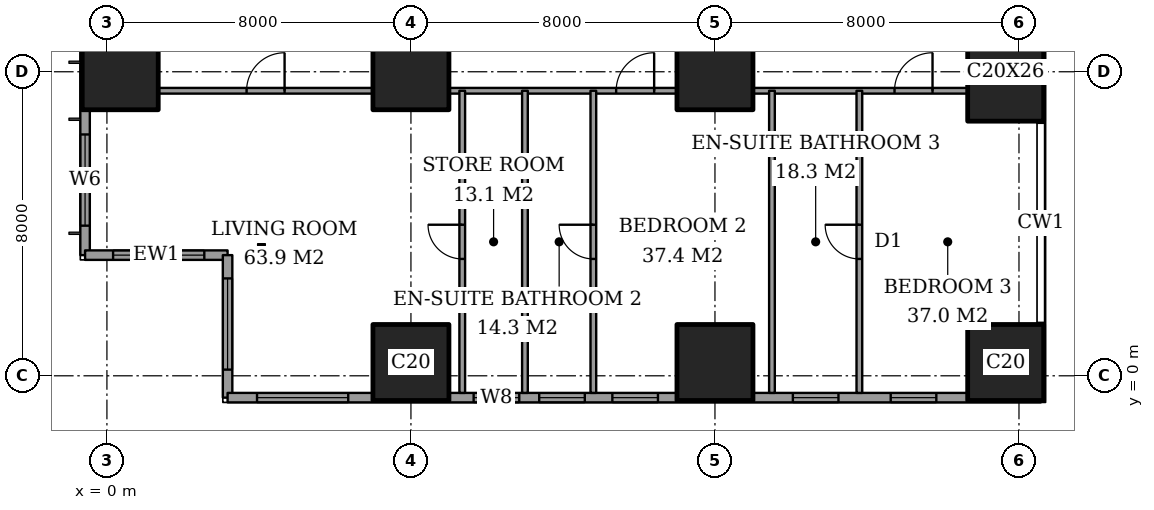
"""IFC4 building model, lengths in metres.
Left out: names, types, materials, properties, quantities, classifications, styles, units other than length and angle.
Written with IfcOpenShell. Run it as: python <this file> out.ifc"""

import sys

from ifc_helpers import new_model, si_unit, direction, frame, frame_2d, origin, origin_2d, place, context, subcontext, project, spatial, rectangle, extrude, element, fill, save


model = new_model("IFC4")
c1 = context("Model", 3, precision=1e-05, world=origin(), true_north=direction((0.0, 1.0)))
c2 = subcontext(c1, "Body", "Model", "MODEL_VIEW")
j1 = project(units=[si_unit("LENGTHUNIT", "METRE"), si_unit("PLANEANGLEUNIT", "RADIAN")], contexts=[c1])
p1 = place(None, origin())
s1 = spatial("IfcSite", under=j1, at=p1, CompositionType="ELEMENT")
p2 = place(p1, origin())
s2 = spatial("IfcBuilding", under=s1, at=p2, CompositionType="ELEMENT")
p3 = place(p2, frame((0.0, 0.0, 29.6)))
s3 = spatial("IfcBuildingStorey", under=s2, at=p3, CompositionType="ELEMENT", Elevation=29.6)
for number, where, z_axis, x_axis in (
    (1, (0.35, 8.0, 0.0), (0.0, 0.0, 1.0), (1.0, 0.0, 0.0)),
    (2, (8.0, 0.35, 0.0), (0.0, 0.0, 1.0), (1.0, 0.0, 0.0)),
    (3, (8.0, 8.0, 0.0), (0.0, 0.0, 1.0), (1.0, 0.0, 0.0)),
    (4, (16.0, 0.35, 0.0), (0.0, 0.0, 1.0), (1.0, 0.0, 0.0)),
    (5, (16.0, 8.0, 0.0), (0.0, 0.0, 1.0), (1.0, 0.0, 0.0)),
    (6, (23.65, 0.35, 0.0), (0.0, 0.0, 1.0), (1.0, 0.0, 0.0)),
):
    element("IfcColumn", number, at=place(p3, frame(where, z_axis=z_axis, x_axis=x_axis)), inside=s3, PredefinedType="COLUMN", context=c2, shape_type="SweptSolid", body=[
        extrude(rectangle(XDim=2.0, YDim=2.0, at=origin_2d()), origin(), (0.0, 0.0, 1.0), 3.6),
    ])
p4 = place(p3, frame((23.65, 8.0, 0.0), z_axis=(0.0, 0.0, 1.0), x_axis=(1.0, 0.0, 0.0)))
e7 = element("IfcColumn", 7, at=p4, inside=s3, PredefinedType="COLUMN", context=c2, shape_type="SweptSolid", body=[
    extrude(rectangle(XDim=2.0, YDim=2.6, at=origin_2d()), origin(), (0.0, 0.0, 1.0), 3.6),
])
p5 = place(p3, frame((-0.575, 44.825, 0.0), z_axis=(0.0, 0.0, 1.0), x_axis=(0.0, -1.0, 0.0)))
e8 = element("IfcWall", 8, at=p5, inside=s3, PredefinedType="SOLIDWALL", context=c2, shape_type="SweptSolid", body=[
    extrude(rectangle(XDim=41.65, YDim=0.25, at=frame_2d((20.825, 0.0))), origin(), (0.0, 0.0, 1.0), 3.6),
])
p6 = place(p5, frame((0.775, 0.0, 0.6)))
e9 = element("IfcOpeningElement", 9, at=p6, cuts=e8, PredefinedType="OPENING", context=c2, shape_type="SweptSolid", body=[
    extrude(rectangle(XDim=2.4, YDim=2.0, at=frame_2d((1.2, 1.0))), frame((0.0, 0.135, 0.0), z_axis=(0.0, -1.0, 0.0), x_axis=(1.0, 0.0, 0.0)), (0.0, 0.0, 1.0), 0.27),
])
p7 = place(p5, frame((6.225, 0.0, 0.6)))
e10 = element("IfcOpeningElement", 10, at=p7, cuts=e8, PredefinedType="OPENING", context=c2, shape_type="SweptSolid", body=[
    extrude(rectangle(XDim=1.2, YDim=2.0, at=frame_2d((0.6, 1.0))), frame((0.0, 0.135, 0.0), z_axis=(0.0, -1.0, 0.0), x_axis=(1.0, 0.0, 0.0)), (0.0, 0.0, 1.0), 0.27),
])
p8 = place(p5, frame((8.625, 0.0, 0.6)))
e11 = element("IfcOpeningElement", 11, at=p8, cuts=e8, PredefinedType="OPENING", context=c2, shape_type="SweptSolid", body=[
    extrude(rectangle(XDim=2.4, YDim=2.0, at=frame_2d((1.2, 1.0))), frame((0.0, 0.135, 0.0), z_axis=(0.0, -1.0, 0.0), x_axis=(1.0, 0.0, 0.0)), (0.0, 0.0, 1.0), 0.27),
])
p9 = place(p5, frame((15.625, 0.0, 0.6)))
e12 = element("IfcOpeningElement", 12, at=p9, cuts=e8, PredefinedType="OPENING", context=c2, shape_type="SweptSolid", body=[
    extrude(rectangle(XDim=2.4, YDim=2.0, at=frame_2d((1.2, 1.0))), frame((0.0, 0.135, 0.0), z_axis=(0.0, -1.0, 0.0), x_axis=(1.0, 0.0, 0.0)), (0.0, 0.0, 1.0), 0.27),
])
p10 = place(p5, frame((23.625, 0.0, 0.6)))
e13 = element("IfcOpeningElement", 13, at=p10, cuts=e8, PredefinedType="OPENING", context=c2, shape_type="SweptSolid", body=[
    extrude(rectangle(XDim=2.4, YDim=2.0, at=frame_2d((1.2, 1.0))), frame((0.0, 0.135, 0.0), z_axis=(0.0, -1.0, 0.0), x_axis=(1.0, 0.0, 0.0)), (0.0, 0.0, 1.0), 0.27),
])
p11 = place(p5, frame((30.825, 0.0, 0.6)))
e14 = element("IfcOpeningElement", 14, at=p11, cuts=e8, PredefinedType="OPENING", context=c2, shape_type="SweptSolid", body=[
    extrude(rectangle(XDim=2.4, YDim=2.0, at=frame_2d((1.2, 1.0))), frame((0.0, 0.135, 0.0), z_axis=(0.0, -1.0, 0.0), x_axis=(1.0, 0.0, 0.0)), (0.0, 0.0, 1.0), 0.27),
])
p12 = place(p5, frame((34.5, 0.0, 0.6)))
e15 = element("IfcOpeningElement", 15, at=p12, cuts=e8, PredefinedType="OPENING", context=c2, shape_type="SweptSolid", body=[
    extrude(rectangle(XDim=1.2, YDim=2.0, at=frame_2d((0.6, 1.0))), frame((0.0, 0.135, 0.0), z_axis=(0.0, -1.0, 0.0), x_axis=(1.0, 0.0, 0.0)), (0.0, 0.0, 1.0), 0.27),
])
p13 = place(p5, frame((38.475, 0.0, 0.6)))
e16 = element("IfcOpeningElement", 16, at=p13, cuts=e8, PredefinedType="OPENING", context=c2, shape_type="SweptSolid", body=[
    extrude(rectangle(XDim=2.4, YDim=2.0, at=frame_2d((1.2, 1.0))), frame((0.0, 0.135, 0.0), z_axis=(0.0, -1.0, 0.0), x_axis=(1.0, 0.0, 0.0)), (0.0, 0.0, 1.0), 0.27),
])
p14 = place(p3, frame((-0.575, 3.175, 0.0), z_axis=(0.0, 0.0, 1.0), x_axis=(1.0, 0.0, 0.0)))
e17 = element("IfcWall", 17, at=p14, inside=s3, PredefinedType="SOLIDWALL", context=c2, shape_type="SweptSolid", body=[
    extrude(rectangle(XDim=3.75, YDim=0.25, at=frame_2d((1.875, 0.0))), origin(), (0.0, 0.0, 1.0), 3.6),
])
p15 = place(p14, frame((0.738, 0.0, 0.6)))
e18 = element("IfcOpeningElement", 18, at=p15, cuts=e17, PredefinedType="OPENING", context=c2, shape_type="SweptSolid", body=[
    extrude(rectangle(XDim=2.4, YDim=2.0, at=frame_2d((1.2, 1.0))), frame((0.0, 0.135, 0.0), z_axis=(0.0, -1.0, 0.0), x_axis=(1.0, 0.0, 0.0)), (0.0, 0.0, 1.0), 0.27),
])
p16 = place(p3, frame((3.175, 3.175, 0.0), z_axis=(0.0, 0.0, 1.0), x_axis=(0.0, -1.0, 0.0)))
e19 = element("IfcWall", 19, at=p16, inside=s3, PredefinedType="SOLIDWALL", context=c2, shape_type="SweptSolid", body=[
    extrude(rectangle(XDim=3.75, YDim=0.25, at=frame_2d((1.875, 0.0))), origin(), (0.0, 0.0, 1.0), 3.6),
])
p17 = place(p16, frame((0.613, 0.0, 0.6)))
e20 = element("IfcOpeningElement", 20, at=p17, cuts=e19, PredefinedType="OPENING", context=c2, shape_type="SweptSolid", body=[
    extrude(rectangle(XDim=2.4, YDim=2.0, at=frame_2d((1.2, 1.0))), frame((0.0, 0.135, 0.0), z_axis=(0.0, -1.0, 0.0), x_axis=(1.0, 0.0, 0.0)), (0.0, 0.0, 1.0), 0.27),
])
p18 = place(p3, frame((3.175, -0.575, 0.0), z_axis=(0.0, 0.0, 1.0), x_axis=(1.0, 0.0, 0.0)))
e21 = element("IfcWall", 21, at=p18, inside=s3, PredefinedType="SOLIDWALL", context=c2, shape_type="SweptSolid", body=[
    extrude(rectangle(XDim=21.4, YDim=0.25, at=frame_2d((10.7, 0.0))), origin(), (0.0, 0.0, 1.0), 3.6),
])
p19 = place(p18, frame((0.775, 0.0, 0.6)))
e22 = element("IfcOpeningElement", 22, at=p19, cuts=e21, PredefinedType="OPENING", context=c2, shape_type="SweptSolid", body=[
    extrude(rectangle(XDim=2.4, YDim=2.0, at=frame_2d((1.2, 1.0))), frame((0.0, 0.135, 0.0), z_axis=(0.0, -1.0, 0.0), x_axis=(1.0, 0.0, 0.0)), (0.0, 0.0, 1.0), 0.27),
])
p20 = place(p18, frame((6.475, 0.0, 0.6)))
e23 = element("IfcOpeningElement", 23, at=p20, cuts=e21, PredefinedType="OPENING", context=c2, shape_type="SweptSolid", body=[
    extrude(rectangle(XDim=1.2, YDim=2.0, at=frame_2d((0.6, 1.0))), frame((0.0, 0.135, 0.0), z_axis=(0.0, -1.0, 0.0), x_axis=(1.0, 0.0, 0.0)), (0.0, 0.0, 1.0), 0.27),
])
p21 = place(p18, frame((8.2, 0.0, 0.6)))
e24 = element("IfcOpeningElement", 24, at=p21, cuts=e21, PredefinedType="OPENING", context=c2, shape_type="SweptSolid", body=[
    extrude(rectangle(XDim=1.2, YDim=2.0, at=frame_2d((0.6, 1.0))), frame((0.0, 0.135, 0.0), z_axis=(0.0, -1.0, 0.0), x_axis=(1.0, 0.0, 0.0)), (0.0, 0.0, 1.0), 0.27),
])
p22 = place(p18, frame((10.125, 0.0, 0.6)))
e25 = element("IfcOpeningElement", 25, at=p22, cuts=e21, PredefinedType="OPENING", context=c2, shape_type="SweptSolid", body=[
    extrude(rectangle(XDim=1.2, YDim=2.0, at=frame_2d((0.6, 1.0))), frame((0.0, 0.135, 0.0), z_axis=(0.0, -1.0, 0.0), x_axis=(1.0, 0.0, 0.0)), (0.0, 0.0, 1.0), 0.27),
])
p23 = place(p18, frame((14.875, 0.0, 0.6)))
e26 = element("IfcOpeningElement", 26, at=p23, cuts=e21, PredefinedType="OPENING", context=c2, shape_type="SweptSolid", body=[
    extrude(rectangle(XDim=1.2, YDim=2.0, at=frame_2d((0.6, 1.0))), frame((0.0, 0.135, 0.0), z_axis=(0.0, -1.0, 0.0), x_axis=(1.0, 0.0, 0.0)), (0.0, 0.0, 1.0), 0.27),
])
p24 = place(p18, frame((17.45, 0.0, 0.6)))
e27 = element("IfcOpeningElement", 27, at=p24, cuts=e21, PredefinedType="OPENING", context=c2, shape_type="SweptSolid", body=[
    extrude(rectangle(XDim=1.2, YDim=2.0, at=frame_2d((0.6, 1.0))), frame((0.0, 0.135, 0.0), z_axis=(0.0, -1.0, 0.0), x_axis=(1.0, 0.0, 0.0)), (0.0, 0.0, 1.0), 0.27),
])
p25 = place(p3, frame((1.35, 7.5, 0.0), z_axis=(0.0, 0.0, 1.0), x_axis=(1.0, 0.0, 0.0)))
e28 = element("IfcWall", 28, at=p25, inside=s3, PredefinedType="PARTITIONING", context=c2, shape_type="SweptSolid", body=[
    extrude(rectangle(XDim=5.65, YDim=0.15, at=frame_2d((2.825, 0.0))), origin(), (0.0, 0.0, 1.0), 3.35),
])
p26 = place(p25, frame((2.325, 0.0, 0.0)))
e29 = element("IfcOpeningElement", 29, at=p26, cuts=e28, PredefinedType="OPENING", context=c2, shape_type="SweptSolid", body=[
    extrude(rectangle(XDim=1.0, YDim=2.1, at=frame_2d((0.5, 1.05))), frame((0.0, 0.085, 0.0), z_axis=(0.0, -1.0, 0.0), x_axis=(1.0, 0.0, 0.0)), (0.0, 0.0, 1.0), 0.17),
])
p27 = place(p3, frame((9.0, 7.5, 0.0), z_axis=(0.0, 0.0, 1.0), x_axis=(1.0, 0.0, 0.0)))
e30 = element("IfcWall", 30, at=p27, inside=s3, PredefinedType="PARTITIONING", context=c2, shape_type="SweptSolid", body=[
    extrude(rectangle(XDim=6.0, YDim=0.15, at=frame_2d((3.0, 0.0))), origin(), (0.0, 0.0, 1.0), 3.35),
])
p28 = place(p27, frame((4.4, 0.0, 0.0)))
e31 = element("IfcOpeningElement", 31, at=p28, cuts=e30, PredefinedType="OPENING", context=c2, shape_type="SweptSolid", body=[
    extrude(rectangle(XDim=1.0, YDim=2.1, at=frame_2d((0.5, 1.05))), frame((0.0, 0.085, 0.0), z_axis=(0.0, -1.0, 0.0), x_axis=(1.0, 0.0, 0.0)), (0.0, 0.0, 1.0), 0.17),
])
p29 = place(p3, frame((17.0, 7.5, 0.0), z_axis=(0.0, 0.0, 1.0), x_axis=(1.0, 0.0, 0.0)))
e32 = element("IfcWall", 32, at=p29, inside=s3, PredefinedType="PARTITIONING", context=c2, shape_type="SweptSolid", body=[
    extrude(rectangle(XDim=5.65, YDim=0.15, at=frame_2d((2.825, 0.0))), origin(), (0.0, 0.0, 1.0), 3.35),
])
p30 = place(p29, frame((3.725, 0.0, 0.0)))
e33 = element("IfcOpeningElement", 33, at=p30, cuts=e32, PredefinedType="OPENING", context=c2, shape_type="SweptSolid", body=[
    extrude(rectangle(XDim=1.0, YDim=2.1, at=frame_2d((0.5, 1.05))), frame((0.0, 0.085, 0.0), z_axis=(0.0, -1.0, 0.0), x_axis=(1.0, 0.0, 0.0)), (0.0, 0.0, 1.0), 0.17),
])
p31 = place(p3, frame((9.35, -0.45, 0.0), z_axis=(0.0, 0.0, 1.0), x_axis=(0.0, 1.0, 0.0)))
e34 = element("IfcWall", 34, at=p31, inside=s3, PredefinedType="PARTITIONING", context=c2, shape_type="SweptSolid", body=[
    extrude(rectangle(XDim=7.95, YDim=0.15, at=frame_2d((3.975, 0.0))), origin(), (0.0, 0.0, 1.0), 3.35),
])
p32 = place(p31, frame((3.525, 0.0, 0.0)))
e35 = element("IfcOpeningElement", 35, at=p32, cuts=e34, PredefinedType="OPENING", context=c2, shape_type="SweptSolid", body=[
    extrude(rectangle(XDim=0.9, YDim=2.1, at=frame_2d((0.45, 1.05))), frame((0.0, 0.085, 0.0), z_axis=(0.0, -1.0, 0.0), x_axis=(1.0, 0.0, 0.0)), (0.0, 0.0, 1.0), 0.17),
])
p33 = place(p3, frame((11.0, -0.45, 0.0), z_axis=(0.0, 0.0, 1.0), x_axis=(0.0, 1.0, 0.0)))
e36 = element("IfcWall", 36, at=p33, inside=s3, PredefinedType="PARTITIONING", context=c2, shape_type="SweptSolid", body=[
    extrude(rectangle(XDim=7.95, YDim=0.15, at=frame_2d((3.975, 0.0))), origin(), (0.0, 0.0, 1.0), 3.35),
])
p34 = place(p3, frame((12.8, -0.45, 0.0), z_axis=(0.0, 0.0, 1.0), x_axis=(0.0, 1.0, 0.0)))
e37 = element("IfcWall", 37, at=p34, inside=s3, PredefinedType="PARTITIONING", context=c2, shape_type="SweptSolid", body=[
    extrude(rectangle(XDim=7.95, YDim=0.15, at=frame_2d((3.975, 0.0))), origin(), (0.0, 0.0, 1.0), 3.35),
])
p35 = place(p34, frame((3.525, 0.0, 0.0)))
e38 = element("IfcOpeningElement", 38, at=p35, cuts=e37, PredefinedType="OPENING", context=c2, shape_type="SweptSolid", body=[
    extrude(rectangle(XDim=0.9, YDim=2.1, at=frame_2d((0.45, 1.05))), frame((0.0, 0.085, 0.0), z_axis=(0.0, -1.0, 0.0), x_axis=(1.0, 0.0, 0.0)), (0.0, 0.0, 1.0), 0.17),
])
p36 = place(p3, frame((17.5, -0.45, 0.0), z_axis=(0.0, 0.0, 1.0), x_axis=(0.0, 1.0, 0.0)))
e39 = element("IfcWall", 39, at=p36, inside=s3, PredefinedType="PARTITIONING", context=c2, shape_type="SweptSolid", body=[
    extrude(rectangle(XDim=7.95, YDim=0.15, at=frame_2d((3.975, 0.0))), origin(), (0.0, 0.0, 1.0), 3.35),
])
p37 = place(p3, frame((19.8, -0.45, 0.0), z_axis=(0.0, 0.0, 1.0), x_axis=(0.0, 1.0, 0.0)))
e40 = element("IfcWall", 40, at=p37, inside=s3, PredefinedType="PARTITIONING", context=c2, shape_type="SweptSolid", body=[
    extrude(rectangle(XDim=7.95, YDim=0.15, at=frame_2d((3.975, 0.0))), origin(), (0.0, 0.0, 1.0), 3.35),
])
p38 = place(p37, frame((3.525, 0.0, 0.0)))
e41 = element("IfcOpeningElement", 41, at=p38, cuts=e40, PredefinedType="OPENING", context=c2, shape_type="SweptSolid", body=[
    extrude(rectangle(XDim=0.9, YDim=2.1, at=frame_2d((0.45, 1.05))), frame((0.0, 0.085, 0.0), z_axis=(0.0, -1.0, 0.0), x_axis=(1.0, 0.0, 0.0)), (0.0, 0.0, 1.0), 0.17),
])
p39 = place(p13, origin())
e42 = element("IfcWindow", 42, at=p39, inside=s3, PartitioningType="SINGLE_PANEL", PredefinedType="WINDOW", context=c2, shape_type="SweptSolid", body=[
    extrude(rectangle(XDim=2.4, YDim=2.0, at=frame_2d((1.2, 1.0))), frame((0.0, 0.03, 0.0), z_axis=(0.0, -1.0, 0.0), x_axis=(1.0, 0.0, 0.0)), (0.0, 0.0, 1.0), 0.06),
])
fill(e16, e42)
p40 = place(p15, origin())
e43 = element("IfcWindow", 43, at=p40, inside=s3, PartitioningType="SINGLE_PANEL", PredefinedType="WINDOW", context=c2, shape_type="SweptSolid", body=[
    extrude(rectangle(XDim=2.4, YDim=2.0, at=frame_2d((1.2, 1.0))), frame((0.0, 0.03, 0.0), z_axis=(0.0, -1.0, 0.0), x_axis=(1.0, 0.0, 0.0)), (0.0, 0.0, 1.0), 0.06),
])
fill(e18, e43)
p41 = place(p17, origin())
e44 = element("IfcWindow", 44, at=p41, inside=s3, PartitioningType="SINGLE_PANEL", PredefinedType="WINDOW", context=c2, shape_type="SweptSolid", body=[
    extrude(rectangle(XDim=2.4, YDim=2.0, at=frame_2d((1.2, 1.0))), frame((0.0, 0.03, 0.0), z_axis=(0.0, -1.0, 0.0), x_axis=(1.0, 0.0, 0.0)), (0.0, 0.0, 1.0), 0.06),
])
fill(e20, e44)
p42 = place(p19, origin())
e45 = element("IfcWindow", 45, at=p42, inside=s3, PartitioningType="SINGLE_PANEL", PredefinedType="WINDOW", context=c2, shape_type="SweptSolid", body=[
    extrude(rectangle(XDim=2.4, YDim=2.0, at=frame_2d((1.2, 1.0))), frame((0.0, 0.03, 0.0), z_axis=(0.0, -1.0, 0.0), x_axis=(1.0, 0.0, 0.0)), (0.0, 0.0, 1.0), 0.06),
])
fill(e22, e45)
p43 = place(p20, origin())
e46 = element("IfcWindow", 46, at=p43, inside=s3, PartitioningType="SINGLE_PANEL", PredefinedType="WINDOW", context=c2, shape_type="SweptSolid", body=[
    extrude(rectangle(XDim=1.2, YDim=2.0, at=frame_2d((0.6, 1.0))), frame((0.0, 0.03, 0.0), z_axis=(0.0, -1.0, 0.0), x_axis=(1.0, 0.0, 0.0)), (0.0, 0.0, 1.0), 0.06),
])
fill(e23, e46)
p44 = place(p21, origin())
e47 = element("IfcWindow", 47, at=p44, inside=s3, PartitioningType="SINGLE_PANEL", PredefinedType="WINDOW", context=c2, shape_type="SweptSolid", body=[
    extrude(rectangle(XDim=1.2, YDim=2.0, at=frame_2d((0.6, 1.0))), frame((0.0, 0.03, 0.0), z_axis=(0.0, -1.0, 0.0), x_axis=(1.0, 0.0, 0.0)), (0.0, 0.0, 1.0), 0.06),
])
fill(e24, e47)
p45 = place(p22, origin())
e48 = element("IfcWindow", 48, at=p45, inside=s3, PartitioningType="SINGLE_PANEL", PredefinedType="WINDOW", context=c2, shape_type="SweptSolid", body=[
    extrude(rectangle(XDim=1.2, YDim=2.0, at=frame_2d((0.6, 1.0))), frame((0.0, 0.03, 0.0), z_axis=(0.0, -1.0, 0.0), x_axis=(1.0, 0.0, 0.0)), (0.0, 0.0, 1.0), 0.06),
])
fill(e25, e48)
p46 = place(p23, origin())
e49 = element("IfcWindow", 49, at=p46, inside=s3, PartitioningType="SINGLE_PANEL", PredefinedType="WINDOW", context=c2, shape_type="SweptSolid", body=[
    extrude(rectangle(XDim=1.2, YDim=2.0, at=frame_2d((0.6, 1.0))), frame((0.0, 0.03, 0.0), z_axis=(0.0, -1.0, 0.0), x_axis=(1.0, 0.0, 0.0)), (0.0, 0.0, 1.0), 0.06),
])
fill(e26, e49)
p47 = place(p24, origin())
e50 = element("IfcWindow", 50, at=p47, inside=s3, PartitioningType="SINGLE_PANEL", PredefinedType="WINDOW", context=c2, shape_type="SweptSolid", body=[
    extrude(rectangle(XDim=1.2, YDim=2.0, at=frame_2d((0.6, 1.0))), frame((0.0, 0.03, 0.0), z_axis=(0.0, -1.0, 0.0), x_axis=(1.0, 0.0, 0.0)), (0.0, 0.0, 1.0), 0.06),
])
fill(e27, e50)
p48 = place(p26, origin())
e51 = element("IfcDoor", 51, at=p48, inside=s3, OperationType="SINGLE_SWING_LEFT", PredefinedType="DOOR", context=c2, shape_type="SweptSolid", body=[
    extrude(rectangle(XDim=1.0, YDim=2.1, at=frame_2d((0.5, 1.05))), frame((0.0, 0.025, 0.0), z_axis=(0.0, -1.0, 0.0), x_axis=(1.0, 0.0, 0.0)), (0.0, 0.0, 1.0), 0.05),
])
fill(e29, e51)
p49 = place(p32, origin())
e52 = element("IfcDoor", 52, at=p49, inside=s3, OperationType="SINGLE_SWING_LEFT", PredefinedType="DOOR", context=c2, shape_type="SweptSolid", body=[
    extrude(rectangle(XDim=0.9, YDim=2.1, at=frame_2d((0.45, 1.05))), frame((0.0, 0.025, 0.0), z_axis=(0.0, -1.0, 0.0), x_axis=(1.0, 0.0, 0.0)), (0.0, 0.0, 1.0), 0.05),
])
fill(e35, e52)
p50 = place(p35, origin())
e53 = element("IfcDoor", 53, at=p50, inside=s3, OperationType="SINGLE_SWING_LEFT", PredefinedType="DOOR", context=c2, shape_type="SweptSolid", body=[
    extrude(rectangle(XDim=0.9, YDim=2.1, at=frame_2d((0.45, 1.05))), frame((0.0, 0.025, 0.0), z_axis=(0.0, -1.0, 0.0), x_axis=(1.0, 0.0, 0.0)), (0.0, 0.0, 1.0), 0.05),
])
fill(e38, e53)
p51 = place(p28, origin())
e54 = element("IfcDoor", 54, at=p51, inside=s3, OperationType="SINGLE_SWING_LEFT", PredefinedType="DOOR", context=c2, shape_type="SweptSolid", body=[
    extrude(rectangle(XDim=1.0, YDim=2.1, at=frame_2d((0.5, 1.05))), frame((0.0, 0.025, 0.0), z_axis=(0.0, -1.0, 0.0), x_axis=(1.0, 0.0, 0.0)), (0.0, 0.0, 1.0), 0.05),
])
fill(e31, e54)
p52 = place(p38, origin())
e55 = element("IfcDoor", 55, at=p52, inside=s3, OperationType="SINGLE_SWING_LEFT", PredefinedType="DOOR", context=c2, shape_type="SweptSolid", body=[
    extrude(rectangle(XDim=0.9, YDim=2.1, at=frame_2d((0.45, 1.05))), frame((0.0, 0.025, 0.0), z_axis=(0.0, -1.0, 0.0), x_axis=(1.0, 0.0, 0.0)), (0.0, 0.0, 1.0), 0.05),
])
fill(e41, e55)
p53 = place(p30, origin())
e56 = element("IfcDoor", 56, at=p53, inside=s3, OperationType="SINGLE_SWING_LEFT", PredefinedType="DOOR", context=c2, shape_type="SweptSolid", body=[
    extrude(rectangle(XDim=1.0, YDim=2.1, at=frame_2d((0.5, 1.05))), frame((0.0, 0.025, 0.0), z_axis=(0.0, -1.0, 0.0), x_axis=(1.0, 0.0, 0.0)), (0.0, 0.0, 1.0), 0.05),
])
fill(e33, e56)
save(model, sys.argv[1])
